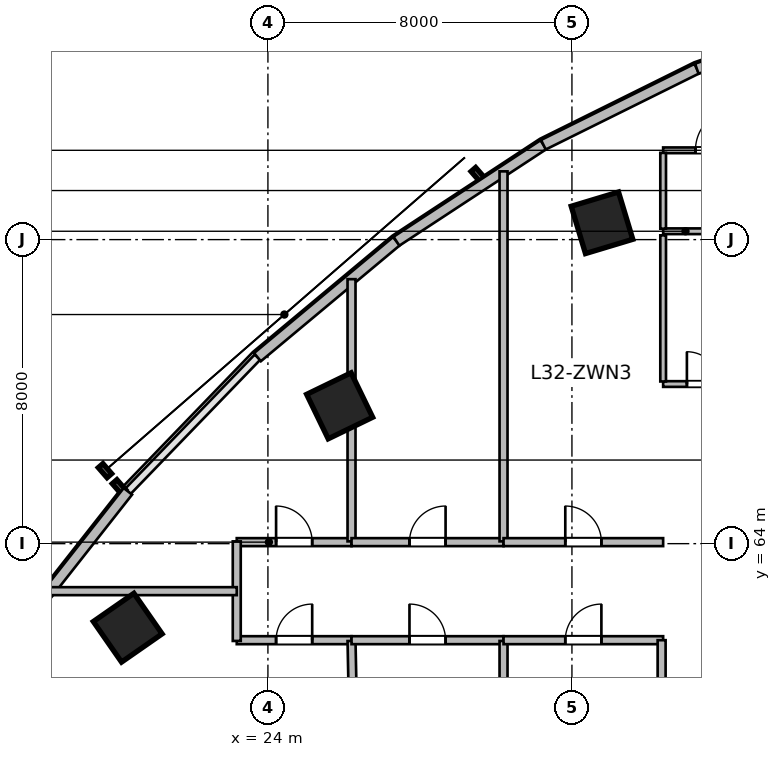
"""IFC4 building model, lengths in metres.
Left out: names, types, materials, properties, quantities, classifications, styles, units other than length and angle.
Written with IfcOpenShell. Run it as: python <this file> out.ifc"""

import sys

from ifc_helpers import new_model, si_unit, direction, frame, frame_2d, origin, origin_2d, place, context, subcontext, project, spatial, rectangle, extrude, source, transform, mapped, element, fill, save


model = new_model("IFC4")
c1 = context("Model", 3, precision=1e-05, world=origin(), true_north=direction((0.0, 1.0)))
c2 = subcontext(c1, "Body", "Model", "MODEL_VIEW")
j1 = project(units=[si_unit("LENGTHUNIT", "METRE"), si_unit("PLANEANGLEUNIT", "RADIAN")], contexts=[c1])
p1 = place(None, origin())
s1 = spatial("IfcSite", under=j1, at=p1, CompositionType="ELEMENT")
p2 = place(p1, origin())
s2 = spatial("IfcBuilding", under=s1, at=p2, CompositionType="ELEMENT")
p3 = place(p2, frame((0.0, 0.0, 135.0)))
s3 = spatial("IfcBuildingStorey", under=s2, at=p3, CompositionType="ELEMENT", Elevation=135.0)
m1 = source(origin(), c2, "Body", "SweptSolid", [
    extrude(rectangle(XDim=1.3, YDim=1.3, at=origin_2d()), origin(), (0.0, 0.0, 1.0), 3.9),
])
for number, where, z_axis, x_axis in (
    (1, (20.311, 61.789, 0.0), (0.0, 0.0, 1.0), (-0.571, 0.821, 0.0)),
    (2, (25.888, 67.627, 0.0), (0.0, 0.0, 1.0), (-0.436, 0.9, 0.0)),
    (3, (32.791, 72.442, 0.0), (0.0, 0.0, 1.0), (-0.289, 0.957, 0.0)),
):
    element("IfcColumn", number, at=place(p3, frame(where, z_axis=z_axis, x_axis=x_axis)), inside=s3, PredefinedType="COLUMN", context=c2, shape_type="MappedRepresentation", body=[
        mapped(m1, transform((0.0, 0.0, 0.0), scale=1.0)),
    ])
m2 = source(origin(), c2, "Body", "SweptSolid", [
    extrude(rectangle(XDim=5.058, YDim=0.28, at=frame_2d((2.529, 0.0))), origin(), (0.0, 0.0, 1.0), 3.65),
])
p4 = place(p3, frame((17.188, 61.4, 0.0), z_axis=(0.0, 0.0, 1.0), x_axis=(0.618145507434, 0.786063694391, 0.0)))
e4 = element("IfcWall", 4, at=p4, inside=s3, PredefinedType="SOLIDWALL", context=c2, shape_type="MappedRepresentation", body=[
    mapped(m2, transform((0.0, 0.0, 0.0), scale=1.0)),
])
m3 = source(origin(), c2, "Body", "SweptSolid", [
    extrude(rectangle(XDim=4.762, YDim=0.28, at=frame_2d((2.381, 0.0))), origin(), (0.0, 0.0, 1.0), 3.65),
])
p5 = place(p3, frame((23.725, 68.907, 0.0), z_axis=(0.0, 0.0, 1.0), x_axis=(0.767952279762, 0.640507061638, 0.0)))
e5 = element("IfcWall", 5, at=p5, inside=s3, PredefinedType="SOLIDWALL", context=c2, shape_type="MappedRepresentation", body=[
    mapped(m3, transform((0.0, 0.0, 0.0), scale=1.0)),
])
m4 = source(origin(), c2, "Body", "SweptSolid", [
    extrude(rectangle(XDim=4.626, YDim=0.28, at=frame_2d((2.313, 0.0))), origin(), (0.0, 0.0, 1.0), 3.65),
])
p6 = place(p3, frame((27.382, 71.958, 0.0), z_axis=(0.0, 0.0, 1.0), x_axis=(0.83595938331, 0.548791316855, 0.0)))
e6 = element("IfcWall", 6, at=p6, inside=s3, PredefinedType="SOLIDWALL", context=c2, shape_type="MappedRepresentation", body=[
    mapped(m4, transform((0.0, 0.0, 0.0), scale=1.0)),
])
m5 = source(origin(), c2, "Body", "SweptSolid", [
    extrude(rectangle(XDim=4.506, YDim=0.28, at=frame_2d((2.253, 0.0))), origin(), (0.0, 0.0, 1.0), 3.65),
])
p7 = place(p3, frame((31.249, 74.496, 0.0), z_axis=(0.0, 0.0, 1.0), x_axis=(0.89597155075, 0.444111450254, 0.0)))
e7 = element("IfcWall", 7, at=p7, inside=s3, PredefinedType="SOLIDWALL", context=c2, shape_type="MappedRepresentation", body=[
    mapped(m5, transform((0.0, 0.0, 0.0), scale=1.0)),
])
m6 = source(origin(), c2, "Body", "SweptSolid", [
    extrude(rectangle(XDim=4.409, YDim=0.28, at=frame_2d((2.205, 0.0))), origin(), (0.0, 0.0, 1.0), 3.65),
])
p8 = place(p3, frame((35.286, 76.497, 0.0), z_axis=(0.0, 0.0, 1.0), x_axis=(0.944879374121, 0.327418643881, 0.0)))
e8 = element("IfcWall", 8, at=p8, inside=s3, PredefinedType="SOLIDWALL", context=c2, shape_type="MappedRepresentation", body=[
    mapped(m6, transform((0.0, 0.0, 0.0), scale=1.0)),
])
m7 = source(origin(), c2, "Body", "SweptSolid", [
    extrude(rectangle(XDim=2.1, YDim=0.15, at=frame_2d((1.05, 0.0))), origin(), (0.0, 0.0, 1.0), 3.65),
])
p9 = place(p3, frame((34.4, 72.22, 0.0), z_axis=(0.0, 0.0, 1.0), x_axis=(1.0, 0.0, 0.0)))
e9 = element("IfcWall", 9, at=p9, inside=s3, PredefinedType="PARTITIONING", context=c2, shape_type="MappedRepresentation", body=[
    mapped(m7, transform((0.0, 0.0, 0.0), scale=1.0)),
])
m8 = source(origin(), c2, "Body", "SweptSolid", [
    extrude(rectangle(XDim=2.8, YDim=0.15, at=frame_2d((1.4, 0.0))), origin(), (0.0, 0.0, 1.0), 3.65),
])
p10 = place(p3, frame((34.4, 74.35, 0.0), z_axis=(0.0, 0.0, 1.0), x_axis=(1.0, 0.0, 0.0)))
e10 = element("IfcWall", 10, at=p10, inside=s3, PredefinedType="PARTITIONING", context=c2, shape_type="MappedRepresentation", body=[
    mapped(m8, transform((0.0, 0.0, 0.0), scale=1.0)),
])
p11 = place(p10, frame((0.85, 0.0, 0.0)))
e11 = element("IfcOpeningElement", 11, at=p11, cuts=e10, PredefinedType="OPENING", context=c2, shape_type="SweptSolid", body=[
    extrude(rectangle(XDim=1.1, YDim=2.15, at=frame_2d((0.55, 1.075))), frame((0.0, 0.085, 0.0), z_axis=(0.0, -1.0, 0.0), x_axis=(1.0, 0.0, 0.0)), (0.0, 0.0, 1.0), 0.17),
])
m9 = source(origin(), c2, "Body", "SweptSolid", [
    extrude(rectangle(XDim=1.995, YDim=0.15, at=frame_2d((0.998, 0.0))), origin(), (0.0, 0.0, 1.0), 3.65),
])
p12 = place(p3, frame((34.4, 72.288, 0.0), z_axis=(0.0, 0.0, 1.0), x_axis=(0.0, 1.0, 0.0)))
e12 = element("IfcWall", 12, at=p12, inside=s3, PredefinedType="PARTITIONING", context=c2, shape_type="MappedRepresentation", body=[
    mapped(m9, transform((0.0, 0.0, 0.0), scale=1.0)),
])
p13 = place(p3, frame((34.4, 68.2, 0.0), z_axis=(0.0, 0.0, 1.0), x_axis=(1.0, 0.0, 0.0)))
e13 = element("IfcWall", 13, at=p13, inside=s3, PredefinedType="PARTITIONING", context=c2, shape_type="MappedRepresentation", body=[
    mapped(m7, transform((0.0, 0.0, 0.0), scale=1.0)),
])
p14 = place(p13, frame((0.625, 0.0, 0.0)))
e14 = element("IfcOpeningElement", 14, at=p14, cuts=e13, PredefinedType="OPENING", context=c2, shape_type="SweptSolid", body=[
    extrude(rectangle(XDim=0.85, YDim=2.1, at=frame_2d((0.425, 1.05))), frame((0.0, 0.085, 0.0), z_axis=(0.0, -1.0, 0.0), x_axis=(1.0, 0.0, 0.0)), (0.0, 0.0, 1.0), 0.17),
])
m10 = source(origin(), c2, "Body", "SweptSolid", [
    extrude(rectangle(XDim=3.845, YDim=0.15, at=frame_2d((1.922, 0.0))), origin(), (0.0, 0.0, 1.0), 3.65),
])
p15 = place(p3, frame((34.4, 68.268, 0.0), z_axis=(0.0, 0.0, 1.0), x_axis=(0.0, 1.0, 0.0)))
e15 = element("IfcWall", 15, at=p15, inside=s3, PredefinedType="PARTITIONING", context=c2, shape_type="MappedRepresentation", body=[
    mapped(m10, transform((0.0, 0.0, 0.0), scale=1.0)),
])
m11 = source(origin(), c2, "Body", "SweptSolid", [
    extrude(rectangle(XDim=3.02, YDim=0.21, at=frame_2d((1.51, 0.0))), origin(), (0.0, 0.0, 1.0), 3.65),
])
p16 = place(p3, frame((23.18, 64.04, 0.0), z_axis=(0.0, 0.0, 1.0), x_axis=(1.0, 0.0, 0.0)))
e16 = element("IfcWall", 16, at=p16, inside=s3, PredefinedType="PARTITIONING", context=c2, shape_type="MappedRepresentation", body=[
    mapped(m11, transform((0.0, 0.0, 0.0), scale=1.0)),
])
p17 = place(p16, frame((1.035, 0.0, 0.0)))
e17 = element("IfcOpeningElement", 17, at=p17, cuts=e16, PredefinedType="OPENING", context=c2, shape_type="SweptSolid", body=[
    extrude(rectangle(XDim=0.95, YDim=2.1, at=frame_2d((0.475, 1.05))), frame((0.0, 0.115, 0.0), z_axis=(0.0, -1.0, 0.0), x_axis=(1.0, 0.0, 0.0)), (0.0, 0.0, 1.0), 0.23),
])
m12 = source(origin(), c2, "Body", "SweptSolid", [
    extrude(rectangle(XDim=6.899, YDim=0.21, at=frame_2d((3.449, 0.0))), origin(), (0.0, 0.0, 1.0), 2.942),
])
p18 = place(p3, frame((26.2, 64.06, 0.0), z_axis=(0.0, 0.0, 1.0), x_axis=(0.0, 1.0, 0.0)))
e18 = element("IfcWall", 18, at=p18, inside=s3, PredefinedType="PARTITIONING", context=c2, shape_type="MappedRepresentation", body=[
    mapped(m12, transform((0.0, 0.0, 0.0), scale=1.0)),
])
m13 = source(origin(), c2, "Body", "SweptSolid", [
    extrude(rectangle(XDim=4.0, YDim=0.21, at=frame_2d((2.0, 0.0))), origin(), (0.0, 0.0, 1.0), 3.65),
])
p19 = place(p3, frame((26.2, 64.04, 0.0), z_axis=(0.0, 0.0, 1.0), x_axis=(1.0, 0.0, 0.0)))
e19 = element("IfcWall", 19, at=p19, inside=s3, PredefinedType="PARTITIONING", context=c2, shape_type="MappedRepresentation", body=[
    mapped(m13, transform((0.0, 0.0, 0.0), scale=1.0)),
])
p20 = place(p19, frame((1.525, 0.0, 0.0)))
e20 = element("IfcOpeningElement", 20, at=p20, cuts=e19, PredefinedType="OPENING", context=c2, shape_type="SweptSolid", body=[
    extrude(rectangle(XDim=0.95, YDim=2.1, at=frame_2d((0.475, 1.05))), frame((0.0, 0.115, 0.0), z_axis=(0.0, -1.0, 0.0), x_axis=(1.0, 0.0, 0.0)), (0.0, 0.0, 1.0), 0.23),
])
m14 = source(origin(), c2, "Body", "SweptSolid", [
    extrude(rectangle(XDim=9.736, YDim=0.21, at=frame_2d((4.868, 0.0))), origin(), (0.0, 0.0, 1.0), 3.65),
])
p21 = place(p3, frame((30.2, 64.06, 0.0), z_axis=(0.0, 0.0, 1.0), x_axis=(0.0, 1.0, 0.0)))
e21 = element("IfcWall", 21, at=p21, inside=s3, PredefinedType="PARTITIONING", context=c2, shape_type="MappedRepresentation", body=[
    mapped(m14, transform((0.0, 0.0, 0.0), scale=1.0)),
])
m15 = source(origin(), c2, "Body", "SweptSolid", [
    extrude(rectangle(XDim=4.2, YDim=0.21, at=frame_2d((2.1, 0.0))), origin(), (0.0, 0.0, 1.0), 3.65),
])
p22 = place(p3, frame((30.2, 64.04, 0.0), z_axis=(0.0, 0.0, 1.0), x_axis=(1.0, 0.0, 0.0)))
e22 = element("IfcWall", 22, at=p22, inside=s3, PredefinedType="PARTITIONING", context=c2, shape_type="MappedRepresentation", body=[
    mapped(m15, transform((0.0, 0.0, 0.0), scale=1.0)),
])
p23 = place(p22, frame((1.625, 0.0, 0.0)))
e23 = element("IfcOpeningElement", 23, at=p23, cuts=e22, PredefinedType="OPENING", context=c2, shape_type="SweptSolid", body=[
    extrude(rectangle(XDim=0.95, YDim=2.1, at=frame_2d((0.475, 1.05))), frame((0.0, 0.115, 0.0), z_axis=(0.0, -1.0, 0.0), x_axis=(1.0, 0.0, 0.0)), (0.0, 0.0, 1.0), 0.23),
])
p24 = place(p3, frame((23.18, 61.46, 0.0), z_axis=(0.0, 0.0, 1.0), x_axis=(1.0, 0.0, 0.0)))
e24 = element("IfcWall", 24, at=p24, inside=s3, PredefinedType="PARTITIONING", context=c2, shape_type="MappedRepresentation", body=[
    mapped(m11, transform((0.0, 0.0, 0.0), scale=1.0)),
])
p25 = place(p24, frame((1.035, 0.0, 0.0)))
e25 = element("IfcOpeningElement", 25, at=p25, cuts=e24, PredefinedType="OPENING", context=c2, shape_type="SweptSolid", body=[
    extrude(rectangle(XDim=0.95, YDim=2.1, at=frame_2d((0.475, 1.05))), frame((0.0, 0.115, 0.0), z_axis=(0.0, -1.0, 0.0), x_axis=(1.0, 0.0, 0.0)), (0.0, 0.0, 1.0), 0.23),
])
m16 = source(origin(), c2, "Body", "SweptSolid", [
    extrude(rectangle(XDim=24.204, YDim=0.21, at=frame_2d((12.102, 0.0))), origin(), (0.0, 0.0, 1.0), 2.942),
])
p26 = place(p3, frame((26.698, 37.241, 0.0), z_axis=(0.0, 0.0, 1.0), x_axis=(-0.020566881318, 0.999788479326, 0.0)))
e26 = element("IfcWall", 26, at=p26, inside=s3, PredefinedType="PARTITIONING", context=c2, shape_type="MappedRepresentation", body=[
    mapped(m16, transform((0.0, 0.0, 0.0), scale=1.0)),
])
p27 = place(p3, frame((26.2, 61.46, 0.0), z_axis=(0.0, 0.0, 1.0), x_axis=(1.0, 0.0, 0.0)))
e27 = element("IfcWall", 27, at=p27, inside=s3, PredefinedType="PARTITIONING", context=c2, shape_type="MappedRepresentation", body=[
    mapped(m13, transform((0.0, 0.0, 0.0), scale=1.0)),
])
p28 = place(p27, frame((1.525, 0.0, 0.0)))
e28 = element("IfcOpeningElement", 28, at=p28, cuts=e27, PredefinedType="OPENING", context=c2, shape_type="SweptSolid", body=[
    extrude(rectangle(XDim=0.95, YDim=2.1, at=frame_2d((0.475, 1.05))), frame((0.0, 0.115, 0.0), z_axis=(0.0, -1.0, 0.0), x_axis=(1.0, 0.0, 0.0)), (0.0, 0.0, 1.0), 0.23),
])
m17 = source(origin(), c2, "Body", "SweptSolid", [
    extrude(rectangle(XDim=19.103, YDim=0.21, at=frame_2d((9.552, 0.0))), origin(), (0.0, 0.0, 1.0), 2.942),
])
p29 = place(p3, frame((30.2, 42.337, 0.0), z_axis=(0.0, 0.0, 1.0), x_axis=(0.0, 1.0, 0.0)))
e29 = element("IfcWall", 29, at=p29, inside=s3, PredefinedType="PARTITIONING", context=c2, shape_type="MappedRepresentation", body=[
    mapped(m17, transform((0.0, 0.0, 0.0), scale=1.0)),
])
p30 = place(p3, frame((30.2, 61.46, 0.0), z_axis=(0.0, 0.0, 1.0), x_axis=(1.0, 0.0, 0.0)))
e30 = element("IfcWall", 30, at=p30, inside=s3, PredefinedType="PARTITIONING", context=c2, shape_type="MappedRepresentation", body=[
    mapped(m15, transform((0.0, 0.0, 0.0), scale=1.0)),
])
p31 = place(p30, frame((1.625, 0.0, 0.0)))
e31 = element("IfcOpeningElement", 31, at=p31, cuts=e30, PredefinedType="OPENING", context=c2, shape_type="SweptSolid", body=[
    extrude(rectangle(XDim=0.95, YDim=2.1, at=frame_2d((0.475, 1.05))), frame((0.0, 0.115, 0.0), z_axis=(0.0, -1.0, 0.0), x_axis=(1.0, 0.0, 0.0)), (0.0, 0.0, 1.0), 0.23),
])
m18 = source(origin(), c2, "Body", "SweptSolid", [
    extrude(rectangle(XDim=13.988, YDim=0.21, at=frame_2d((6.994, 0.0))), origin(), (0.0, 0.0, 1.0), 3.65),
])
p32 = place(p3, frame((34.36, 47.472, 0.0), z_axis=(0.0, 0.0, 1.0), x_axis=(0.0, 1.0, 0.0)))
e32 = element("IfcWall", 32, at=p32, inside=s3, PredefinedType="PARTITIONING", context=c2, shape_type="MappedRepresentation", body=[
    mapped(m18, transform((0.0, 0.0, 0.0), scale=1.0)),
])
m19 = source(origin(), c2, "Body", "SweptSolid", [
    extrude(rectangle(XDim=2.62, YDim=0.21, at=frame_2d((1.31, 0.0))), origin(), (0.0, 0.0, 1.0), 3.65),
])
p33 = place(p3, frame((23.18, 61.44, 0.0), z_axis=(0.0, 0.0, 1.0), x_axis=(0.0, 1.0, 0.0)))
e33 = element("IfcWall", 33, at=p33, inside=s3, PredefinedType="PARTITIONING", context=c2, shape_type="MappedRepresentation", body=[
    mapped(m19, transform((0.0, 0.0, 0.0), scale=1.0)),
])
m20 = source(origin(), c2, "Body", "SweptSolid", [
    extrude(rectangle(XDim=4.917, YDim=0.21, at=frame_2d((2.459, 0.0))), origin(), (0.0, 0.0, 1.0), 3.65),
])
p34 = place(p3, frame((18.262, 62.75, 0.0), z_axis=(0.0, 0.0, 1.0), x_axis=(1.0, 0.0, 0.0)))
e34 = element("IfcWall", 34, at=p34, inside=s3, PredefinedType="PARTITIONING", context=c2, shape_type="MappedRepresentation", body=[
    mapped(m20, transform((0.0, 0.0, 0.0), scale=1.0)),
])
m21 = source(origin(), c2, "Body", "SweptSolid", [
    extrude(rectangle(XDim=0.85, YDim=2.1, at=frame_2d((0.425, 1.05))), frame((0.0, 0.025, 0.0), z_axis=(0.0, -1.0, 0.0), x_axis=(1.0, 0.0, 0.0)), (0.0, 0.0, 1.0), 0.05),
])
p35 = place(p14, origin())
e35 = element("IfcDoor", 35, at=p35, inside=s3, OperationType="SINGLE_SWING_LEFT", PredefinedType="DOOR", context=c2, shape_type="MappedRepresentation", body=[
    mapped(m21, transform((0.0, 0.0, 0.0), scale=1.0)),
])
fill(e14, e35)
m22 = source(origin(), c2, "Body", "SweptSolid", [
    extrude(rectangle(XDim=1.1, YDim=2.15, at=frame_2d((0.55, 1.075))), frame((0.0, 0.025, 0.0), z_axis=(0.0, -1.0, 0.0), x_axis=(1.0, 0.0, 0.0)), (0.0, 0.0, 1.0), 0.05),
])
p36 = place(p11, origin())
e36 = element("IfcDoor", 36, at=p36, inside=s3, OperationType="SINGLE_SWING_RIGHT", PredefinedType="DOOR", context=c2, shape_type="MappedRepresentation", body=[
    mapped(m22, transform((0.0, 0.0, 0.0), scale=1.0)),
])
fill(e11, e36)
m23 = source(origin(), c2, "Body", "SweptSolid", [
    extrude(rectangle(XDim=0.95, YDim=2.1, at=frame_2d((0.475, 1.05))), frame((0.0, 0.025, 0.0), z_axis=(0.0, -1.0, 0.0), x_axis=(1.0, 0.0, 0.0)), (0.0, 0.0, 1.0), 0.05),
])
p37 = place(p17, origin())
e37 = element("IfcDoor", 37, at=p37, inside=s3, OperationType="SINGLE_SWING_LEFT", PredefinedType="DOOR", context=c2, shape_type="MappedRepresentation", body=[
    mapped(m23, transform((0.0, 0.0, 0.0), scale=1.0)),
])
fill(e17, e37)
p38 = place(p20, origin())
e38 = element("IfcDoor", 38, at=p38, inside=s3, OperationType="SINGLE_SWING_RIGHT", PredefinedType="DOOR", context=c2, shape_type="MappedRepresentation", body=[
    mapped(m23, transform((0.0, 0.0, 0.0), scale=1.0)),
])
fill(e20, e38)
p39 = place(p23, origin())
e39 = element("IfcDoor", 39, at=p39, inside=s3, OperationType="SINGLE_SWING_LEFT", PredefinedType="DOOR", context=c2, shape_type="MappedRepresentation", body=[
    mapped(m23, transform((0.0, 0.0, 0.0), scale=1.0)),
])
fill(e23, e39)
p40 = place(p25, origin())
e40 = element("IfcDoor", 40, at=p40, inside=s3, OperationType="SINGLE_SWING_RIGHT", PredefinedType="DOOR", context=c2, shape_type="MappedRepresentation", body=[
    mapped(m23, transform((0.0, 0.0, 0.0), scale=1.0)),
])
fill(e25, e40)
p41 = place(p28, origin())
e41 = element("IfcDoor", 41, at=p41, inside=s3, OperationType="SINGLE_SWING_LEFT", PredefinedType="DOOR", context=c2, shape_type="MappedRepresentation", body=[
    mapped(m23, transform((0.0, 0.0, 0.0), scale=1.0)),
])
fill(e28, e41)
p42 = place(p31, origin())
e42 = element("IfcDoor", 42, at=p42, inside=s3, OperationType="SINGLE_SWING_RIGHT", PredefinedType="DOOR", context=c2, shape_type="MappedRepresentation", body=[
    mapped(m23, transform((0.0, 0.0, 0.0), scale=1.0)),
])
fill(e31, e42)
save(model, sys.argv[1])
